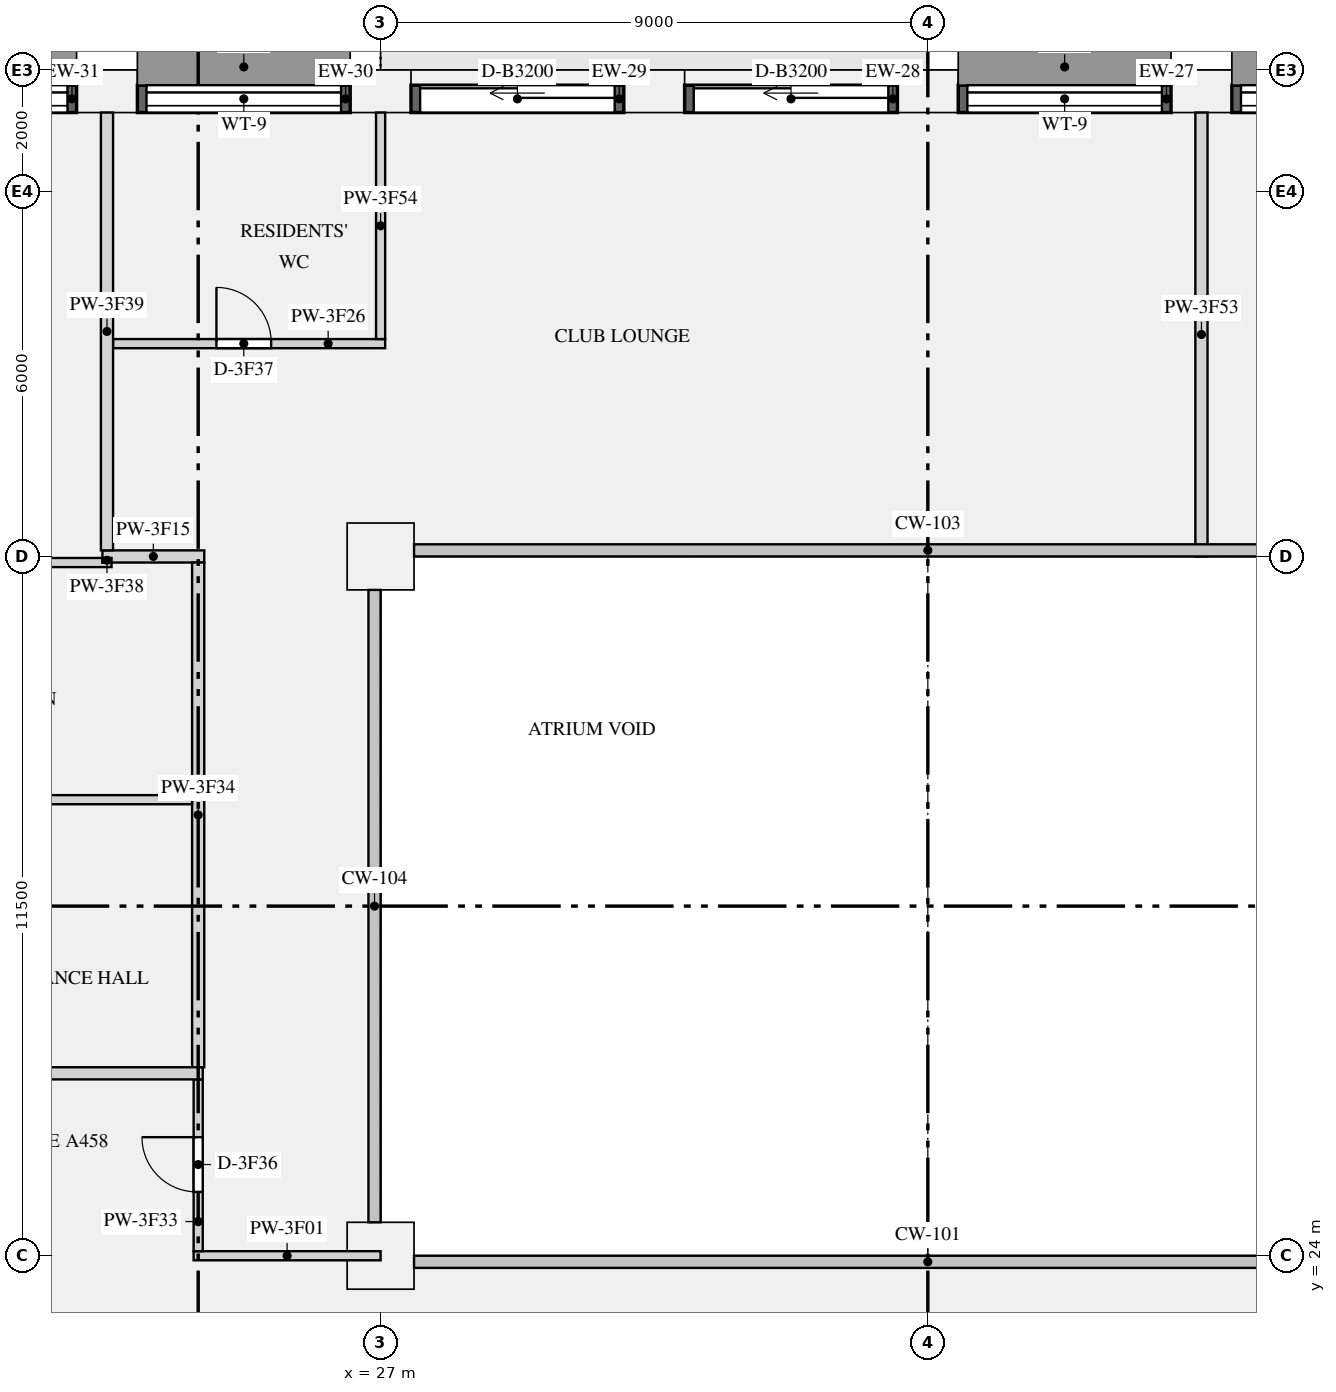
"""IFC4 building model, lengths in metres.
Left out: names, types, materials, properties, quantities, classifications, styles, units other than length and angle.
Written with IfcOpenShell. Run it as: python <this file> out.ifc"""

import sys

from ifc_helpers import new_model, si_unit, direction, frame, frame_2d, origin, origin_2d, place, context, subcontext, project, spatial, rectangle, extrude, element, fill, save


model = new_model("IFC4")
c1 = context("Model", 3, precision=1e-05, world=origin(), true_north=direction((0.0, 1.0)))
c2 = subcontext(c1, "Body", "Model", "MODEL_VIEW")
j1 = project(units=[si_unit("LENGTHUNIT", "METRE"), si_unit("PLANEANGLEUNIT", "RADIAN")], contexts=[c1])
p1 = place(None, origin())
s1 = spatial("IfcSite", under=j1, at=p1, CompositionType="ELEMENT")
p2 = place(p1, origin())
s2 = spatial("IfcBuilding", under=s1, at=p2, CompositionType="ELEMENT")
p3 = place(p2, frame((0.0, 0.0, 182.25)))
s3 = spatial("IfcBuildingStorey", under=s2, at=p3, CompositionType="ELEMENT", Elevation=182.25)
for number, where, z_axis, x_axis in (
    (1, (40.5, 43.15, 0.0), (0.0, 0.0, 1.0), (-1.0, 0.0, 0.0)),
    (2, (36.0, 43.15, 0.0), (0.0, 0.0, 1.0), (-1.0, 0.0, 0.0)),
    (3, (31.5, 43.15, 0.0), (0.0, 0.0, 1.0), (-1.0, 0.0, 0.0)),
    (4, (27.0, 43.15, 0.0), (0.0, 0.0, 1.0), (-1.0, 0.0, 0.0)),
    (5, (22.5, 43.15, 0.0), (0.0, 0.0, 1.0), (-1.0, 0.0, 0.0)),
):
    element("IfcColumn", number, at=place(p3, frame(where, z_axis=z_axis, x_axis=x_axis)), inside=s3, PredefinedType="USERDEFINED", context=c2, shape_type="SweptSolid", body=[
        extrude(rectangle(XDim=1.0, YDim=0.7, at=origin_2d()), origin(), (0.0, 0.0, 1.0), 2.65),
    ])
for number, where, z_axis, x_axis in (
    (6, (27.0, 24.0, 0.0), (0.0, 0.0, 1.0), (1.0, 0.0, 0.0)),
    (7, (27.0, 35.5, 0.0), (0.0, 0.0, 1.0), (1.0, 0.0, 0.0)),
):
    element("IfcColumn", number, at=place(p3, frame(where, z_axis=z_axis, x_axis=x_axis)), inside=s3, PredefinedType="COLUMN", context=c2, shape_type="SweptSolid", body=[
        extrude(rectangle(XDim=1.1, YDim=1.1, at=origin_2d()), origin(), (0.0, 0.0, 1.0), 3.15),
    ])
p4 = place(p3, frame((44.5, 43.025, 0.9), z_axis=(0.0, 0.0, 1.0), x_axis=(-1.0, 0.0, 0.0)))
e8 = element("IfcWall", 8, at=p4, inside=s3, PredefinedType="SOLIDWALL", context=c2, shape_type="SweptSolid", body=[
    extrude(rectangle(XDim=3.5, YDim=0.45, at=frame_2d((1.75, 0.0))), origin(), (0.0, 0.0, 1.0), 1.75),
])
p5 = place(p4, frame((0.15, 0.0, 0.15)))
e9 = element("IfcOpeningElement", 9, at=p5, cuts=e8, PredefinedType="OPENING", context=c2, shape_type="SweptSolid", body=[
    extrude(rectangle(XDim=3.2, YDim=1.5, at=frame_2d((1.6, 0.75))), frame((0.0, 0.235, 0.0), z_axis=(0.0, -1.0, 0.0), x_axis=(1.0, 0.0, 0.0)), (0.0, 0.0, 1.0), 0.47),
])
p6 = place(p3, frame((40.0, 43.025, 0.9), z_axis=(0.0, 0.0, 1.0), x_axis=(-1.0, 0.0, 0.0)))
e10 = element("IfcWall", 10, at=p6, inside=s3, PredefinedType="SOLIDWALL", context=c2, shape_type="SweptSolid", body=[
    extrude(rectangle(XDim=3.5, YDim=0.45, at=frame_2d((1.75, 0.0))), origin(), (0.0, 0.0, 1.0), 1.75),
])
p7 = place(p6, frame((0.15, 0.0, 0.15)))
e11 = element("IfcOpeningElement", 11, at=p7, cuts=e10, PredefinedType="OPENING", context=c2, shape_type="SweptSolid", body=[
    extrude(rectangle(XDim=3.2, YDim=1.5, at=frame_2d((1.6, 0.75))), frame((0.0, 0.235, 0.0), z_axis=(0.0, -1.0, 0.0), x_axis=(1.0, 0.0, 0.0)), (0.0, 0.0, 1.0), 0.47),
])
p8 = place(p3, frame((35.5, 43.025, 0.0), z_axis=(0.0, 0.0, 1.0), x_axis=(-1.0, 0.0, 0.0)))
e12 = element("IfcWall", 12, at=p8, inside=s3, PredefinedType="SOLIDWALL", context=c2, shape_type="SweptSolid", body=[
    extrude(rectangle(XDim=3.5, YDim=0.45, at=frame_2d((1.75, 0.0))), origin(), (0.0, 0.0, 1.0), 2.65),
])
p9 = place(p8, frame((0.15, 0.0, 0.0)))
e13 = element("IfcOpeningElement", 13, at=p9, cuts=e12, PredefinedType="OPENING", context=c2, shape_type="SweptSolid", body=[
    extrude(rectangle(XDim=3.2, YDim=2.3, at=frame_2d((1.6, 1.15))), frame((0.0, 0.235, 0.0), z_axis=(0.0, -1.0, 0.0), x_axis=(1.0, 0.0, 0.0)), (0.0, 0.0, 1.0), 0.47),
])
p10 = place(p3, frame((31.0, 43.025, 0.0), z_axis=(0.0, 0.0, 1.0), x_axis=(-1.0, 0.0, 0.0)))
e14 = element("IfcWall", 14, at=p10, inside=s3, PredefinedType="SOLIDWALL", context=c2, shape_type="SweptSolid", body=[
    extrude(rectangle(XDim=3.5, YDim=0.45, at=frame_2d((1.75, 0.0))), origin(), (0.0, 0.0, 1.0), 2.65),
])
p11 = place(p10, frame((0.15, 0.0, 0.0)))
e15 = element("IfcOpeningElement", 15, at=p11, cuts=e14, PredefinedType="OPENING", context=c2, shape_type="SweptSolid", body=[
    extrude(rectangle(XDim=3.2, YDim=2.3, at=frame_2d((1.6, 1.15))), frame((0.0, 0.235, 0.0), z_axis=(0.0, -1.0, 0.0), x_axis=(1.0, 0.0, 0.0)), (0.0, 0.0, 1.0), 0.47),
])
p12 = place(p3, frame((26.5, 43.025, 0.9), z_axis=(0.0, 0.0, 1.0), x_axis=(-1.0, 0.0, 0.0)))
e16 = element("IfcWall", 16, at=p12, inside=s3, PredefinedType="SOLIDWALL", context=c2, shape_type="SweptSolid", body=[
    extrude(rectangle(XDim=3.5, YDim=0.45, at=frame_2d((1.75, 0.0))), origin(), (0.0, 0.0, 1.0), 1.75),
])
p13 = place(p12, frame((0.15, 0.0, 0.15)))
e17 = element("IfcOpeningElement", 17, at=p13, cuts=e16, PredefinedType="OPENING", context=c2, shape_type="SweptSolid", body=[
    extrude(rectangle(XDim=3.2, YDim=1.5, at=frame_2d((1.6, 0.75))), frame((0.0, 0.235, 0.0), z_axis=(0.0, -1.0, 0.0), x_axis=(1.0, 0.0, 0.0)), (0.0, 0.0, 1.0), 0.47),
])
p14 = place(p3, frame((22.0, 43.025, 0.9), z_axis=(0.0, 0.0, 1.0), x_axis=(-1.0, 0.0, 0.0)))
e18 = element("IfcWall", 18, at=p14, inside=s3, PredefinedType="SOLIDWALL", context=c2, shape_type="SweptSolid", body=[
    extrude(rectangle(XDim=3.5, YDim=0.45, at=frame_2d((1.75, 0.0))), origin(), (0.0, 0.0, 1.0), 1.75),
])
p15 = place(p14, frame((0.15, 0.0, 0.15)))
e19 = element("IfcOpeningElement", 19, at=p15, cuts=e18, PredefinedType="OPENING", context=c2, shape_type="SweptSolid", body=[
    extrude(rectangle(XDim=3.2, YDim=1.5, at=frame_2d((1.6, 0.75))), frame((0.0, 0.235, 0.0), z_axis=(0.0, -1.0, 0.0), x_axis=(1.0, 0.0, 0.0)), (0.0, 0.0, 1.0), 0.47),
])
p16 = place(p3, frame((23.925, 24.0, 0.0), z_axis=(0.0, 0.0, 1.0), x_axis=(1.0, 0.0, 0.0)))
e20 = element("IfcWall", 20, at=p16, inside=s3, PredefinedType="PARTITIONING", context=c2, shape_type="SweptSolid", body=[
    extrude(rectangle(XDim=3.075, YDim=0.15, at=frame_2d((1.538, 0.0))), origin(), (0.0, 0.0, 1.0), 2.65),
])
p17 = place(p3, frame((17.1, 27.0, 0.0), z_axis=(0.0, 0.0, 1.0), x_axis=(1.0, 0.0, 0.0)))
e21 = element("IfcWall", 21, at=p17, inside=s3, PredefinedType="PARTITIONING", context=c2, shape_type="SweptSolid", body=[
    extrude(rectangle(XDim=6.975, YDim=0.2, at=frame_2d((3.487, 0.0))), origin(), (0.0, 0.0, 1.0), 2.65),
])
p18 = place(p17, frame((3.35, 0.0, 0.0)))
e22 = element("IfcOpeningElement", 22, at=p18, cuts=e21, PredefinedType="OPENING", context=c2, shape_type="SweptSolid", body=[
    extrude(rectangle(XDim=1.1, YDim=2.1, at=frame_2d((0.55, 1.05))), frame((0.0, 0.11, 0.0), z_axis=(0.0, -1.0, 0.0), x_axis=(1.0, 0.0, 0.0)), (0.0, 0.0, 1.0), 0.22),
])
p19 = place(p3, frame((15.8, 31.5, 0.0), z_axis=(0.0, 0.0, 1.0), x_axis=(1.0, 0.0, 0.0)))
e23 = element("IfcWall", 23, at=p19, inside=s3, PredefinedType="PARTITIONING", context=c2, shape_type="SweptSolid", body=[
    extrude(rectangle(XDim=8.1, YDim=0.15, at=frame_2d((4.05, 0.0))), origin(), (0.0, 0.0, 1.0), 2.65),
])
p20 = place(p19, frame((4.0, 0.0, 0.0)))
e24 = element("IfcOpeningElement", 24, at=p20, cuts=e23, PredefinedType="OPENING", context=c2, shape_type="SweptSolid", body=[
    extrude(rectangle(XDim=0.9, YDim=2.1, at=frame_2d((0.45, 1.05))), frame((0.0, 0.085, 0.0), z_axis=(0.0, -1.0, 0.0), x_axis=(1.0, 0.0, 0.0)), (0.0, 0.0, 1.0), 0.17),
])
p21 = place(p3, frame((15.8, 35.4, 0.0), z_axis=(0.0, 0.0, 1.0), x_axis=(1.0, 0.0, 0.0)))
e25 = element("IfcWall", 25, at=p21, inside=s3, PredefinedType="PARTITIONING", context=c2, shape_type="SweptSolid", body=[
    extrude(rectangle(XDim=6.775, YDim=0.15, at=frame_2d((3.387, 0.0))), origin(), (0.0, 0.0, 1.0), 2.65),
])
p22 = place(p21, frame((3.975, 0.0, 0.0)))
e26 = element("IfcOpeningElement", 26, at=p22, cuts=e25, PredefinedType="OPENING", context=c2, shape_type="SweptSolid", body=[
    extrude(rectangle(XDim=1.5, YDim=2.1, at=frame_2d((0.75, 1.05))), frame((0.0, 0.085, 0.0), z_axis=(0.0, -1.0, 0.0), x_axis=(1.0, 0.0, 0.0)), (0.0, 0.0, 1.0), 0.17),
])
p23 = place(p3, frame((22.425, 35.5, 0.0), z_axis=(0.0, 0.0, 1.0), x_axis=(1.0, 0.0, 0.0)))
e27 = element("IfcWall", 27, at=p23, inside=s3, PredefinedType="PARTITIONING", context=c2, shape_type="SweptSolid", body=[
    extrude(rectangle(XDim=1.675, YDim=0.2, at=frame_2d((0.837, 0.0))), origin(), (0.0, 0.0, 1.0), 2.65),
])
p24 = place(p3, frame((22.6, 39.0, 0.0), z_axis=(0.0, 0.0, 1.0), x_axis=(1.0, 0.0, 0.0)))
e28 = element("IfcWall", 28, at=p24, inside=s3, PredefinedType="PARTITIONING", context=c2, shape_type="SweptSolid", body=[
    extrude(rectangle(XDim=4.475, YDim=0.15, at=frame_2d((2.237, 0.0))), origin(), (0.0, 0.0, 1.0), 2.65),
])
p25 = place(p24, frame((1.7, 0.0, 0.0)))
e29 = element("IfcOpeningElement", 29, at=p25, cuts=e28, PredefinedType="OPENING", context=c2, shape_type="SweptSolid", body=[
    extrude(rectangle(XDim=0.9, YDim=2.1, at=frame_2d((0.45, 1.05))), frame((0.0, 0.085, 0.0), z_axis=(0.0, -1.0, 0.0), x_axis=(1.0, 0.0, 0.0)), (0.0, 0.0, 1.0), 0.17),
])
p26 = place(p3, frame((24.0, 24.075, 0.0), z_axis=(0.0, 0.0, 1.0), x_axis=(0.0, 1.0, 0.0)))
e30 = element("IfcWall", 30, at=p26, inside=s3, PredefinedType="PARTITIONING", context=c2, shape_type="SweptSolid", body=[
    extrude(rectangle(XDim=2.825, YDim=0.15, at=frame_2d((1.413, 0.0))), origin(), (0.0, 0.0, 1.0), 2.65),
])
p27 = place(p26, frame((0.975, 0.0, 0.0)))
e31 = element("IfcOpeningElement", 31, at=p27, cuts=e30, PredefinedType="OPENING", context=c2, shape_type="SweptSolid", body=[
    extrude(rectangle(XDim=0.9, YDim=2.1, at=frame_2d((0.45, 1.05))), frame((0.0, 0.085, 0.0), z_axis=(0.0, -1.0, 0.0), x_axis=(1.0, 0.0, 0.0)), (0.0, 0.0, 1.0), 0.17),
])
p28 = place(p3, frame((24.0, 27.1, 0.0), z_axis=(0.0, 0.0, 1.0), x_axis=(0.0, 1.0, 0.0)))
e32 = element("IfcWall", 32, at=p28, inside=s3, PredefinedType="PARTITIONING", context=c2, shape_type="SweptSolid", body=[
    extrude(rectangle(XDim=8.3, YDim=0.2, at=frame_2d((4.15, 0.0))), origin(), (0.0, 0.0, 1.0), 2.65),
])
p29 = place(p3, frame((22.5, 35.4, 0.0), z_axis=(0.0, 0.0, 1.0), x_axis=(0.0, 1.0, 0.0)))
e33 = element("IfcWall", 33, at=p29, inside=s3, PredefinedType="PARTITIONING", context=c2, shape_type="SweptSolid", body=[
    extrude(rectangle(XDim=0.075, YDim=0.15, at=frame_2d((0.038, 0.0))), origin(), (0.0, 0.0, 1.0), 2.65),
])
p30 = place(p3, frame((22.5, 35.6, 0.0), z_axis=(0.0, 0.0, 1.0), x_axis=(0.0, 1.0, 0.0)))
e34 = element("IfcWall", 34, at=p30, inside=s3, PredefinedType="PARTITIONING", context=c2, shape_type="SweptSolid", body=[
    extrude(rectangle(XDim=7.2, YDim=0.2, at=frame_2d((3.6, 0.0))), origin(), (0.0, 0.0, 1.0), 2.65),
])
p31 = place(p3, frame((40.5, 35.5, 0.0), z_axis=(0.0, 0.0, 1.0), x_axis=(0.0, 1.0, 0.0)))
e35 = element("IfcWall", 35, at=p31, inside=s3, PredefinedType="PARTITIONING", context=c2, shape_type="SweptSolid", body=[
    extrude(rectangle(XDim=7.3, YDim=0.2, at=frame_2d((3.65, 0.0))), origin(), (0.0, 0.0, 1.0), 2.65),
])
p32 = place(p3, frame((27.0, 39.075, 0.0), z_axis=(0.0, 0.0, 1.0), x_axis=(0.0, 1.0, 0.0)))
e36 = element("IfcWall", 36, at=p32, inside=s3, PredefinedType="PARTITIONING", context=c2, shape_type="SweptSolid", body=[
    extrude(rectangle(XDim=3.725, YDim=0.15, at=frame_2d((1.863, 0.0))), origin(), (0.0, 0.0, 1.0), 2.65),
])
p33 = place(p5, origin())
e37 = element("IfcWindow", 37, at=p33, inside=s3, PartitioningType="SINGLE_PANEL", PredefinedType="WINDOW", context=c2, shape_type="SweptSolid", body=[
    extrude(rectangle(XDim=3.2, YDim=1.5, at=frame_2d((1.6, 0.75))), frame((0.0, -0.065, 0.0), z_axis=(0.0, -1.0, 0.0), x_axis=(1.0, 0.0, 0.0)), (0.0, 0.0, 1.0), 0.06),
])
fill(e9, e37)
p34 = place(p7, origin())
e38 = element("IfcWindow", 38, at=p34, inside=s3, PartitioningType="SINGLE_PANEL", PredefinedType="WINDOW", context=c2, shape_type="SweptSolid", body=[
    extrude(rectangle(XDim=3.2, YDim=1.5, at=frame_2d((1.6, 0.75))), frame((0.0, -0.065, 0.0), z_axis=(0.0, -1.0, 0.0), x_axis=(1.0, 0.0, 0.0)), (0.0, 0.0, 1.0), 0.06),
])
fill(e11, e38)
p35 = place(p9, origin())
e39 = element("IfcDoor", 39, at=p35, inside=s3, OperationType="SLIDING_TO_LEFT", PredefinedType="DOOR", context=c2, shape_type="SweptSolid", body=[
    extrude(rectangle(XDim=3.2, YDim=2.3, at=frame_2d((1.6, 1.15))), frame((0.0, -0.07, 0.0), z_axis=(0.0, -1.0, 0.0), x_axis=(1.0, 0.0, 0.0)), (0.0, 0.0, 1.0), 0.05),
])
fill(e13, e39)
p36 = place(p11, origin())
e40 = element("IfcDoor", 40, at=p36, inside=s3, OperationType="SLIDING_TO_LEFT", PredefinedType="DOOR", context=c2, shape_type="SweptSolid", body=[
    extrude(rectangle(XDim=3.2, YDim=2.3, at=frame_2d((1.6, 1.15))), frame((0.0, -0.07, 0.0), z_axis=(0.0, -1.0, 0.0), x_axis=(1.0, 0.0, 0.0)), (0.0, 0.0, 1.0), 0.05),
])
fill(e15, e40)
p37 = place(p13, origin())
e41 = element("IfcWindow", 41, at=p37, inside=s3, PartitioningType="SINGLE_PANEL", PredefinedType="WINDOW", context=c2, shape_type="SweptSolid", body=[
    extrude(rectangle(XDim=3.2, YDim=1.5, at=frame_2d((1.6, 0.75))), frame((0.0, -0.065, 0.0), z_axis=(0.0, -1.0, 0.0), x_axis=(1.0, 0.0, 0.0)), (0.0, 0.0, 1.0), 0.06),
])
fill(e17, e41)
p38 = place(p15, origin())
e42 = element("IfcWindow", 42, at=p38, inside=s3, PartitioningType="SINGLE_PANEL", PredefinedType="WINDOW", context=c2, shape_type="SweptSolid", body=[
    extrude(rectangle(XDim=3.2, YDim=1.5, at=frame_2d((1.6, 0.75))), frame((0.0, -0.065, 0.0), z_axis=(0.0, -1.0, 0.0), x_axis=(1.0, 0.0, 0.0)), (0.0, 0.0, 1.0), 0.06),
])
fill(e19, e42)
p39 = place(p27, origin())
e43 = element("IfcDoor", 43, at=p39, inside=s3, OperationType="SINGLE_SWING_RIGHT", PredefinedType="DOOR", context=c2, shape_type="SweptSolid", body=[
    extrude(rectangle(XDim=0.9, YDim=2.1, at=frame_2d((0.45, 1.05))), frame((0.0, 0.025, 0.0), z_axis=(0.0, -1.0, 0.0), x_axis=(1.0, 0.0, 0.0)), (0.0, 0.0, 1.0), 0.05),
])
fill(e31, e43)
p40 = place(p25, origin())
e44 = element("IfcDoor", 44, at=p40, inside=s3, OperationType="SINGLE_SWING_LEFT", PredefinedType="DOOR", context=c2, shape_type="SweptSolid", body=[
    extrude(rectangle(XDim=0.9, YDim=2.1, at=frame_2d((0.45, 1.05))), frame((0.0, 0.025, 0.0), z_axis=(0.0, -1.0, 0.0), x_axis=(1.0, 0.0, 0.0)), (0.0, 0.0, 1.0), 0.05),
])
fill(e29, e44)
save(model, sys.argv[1])
